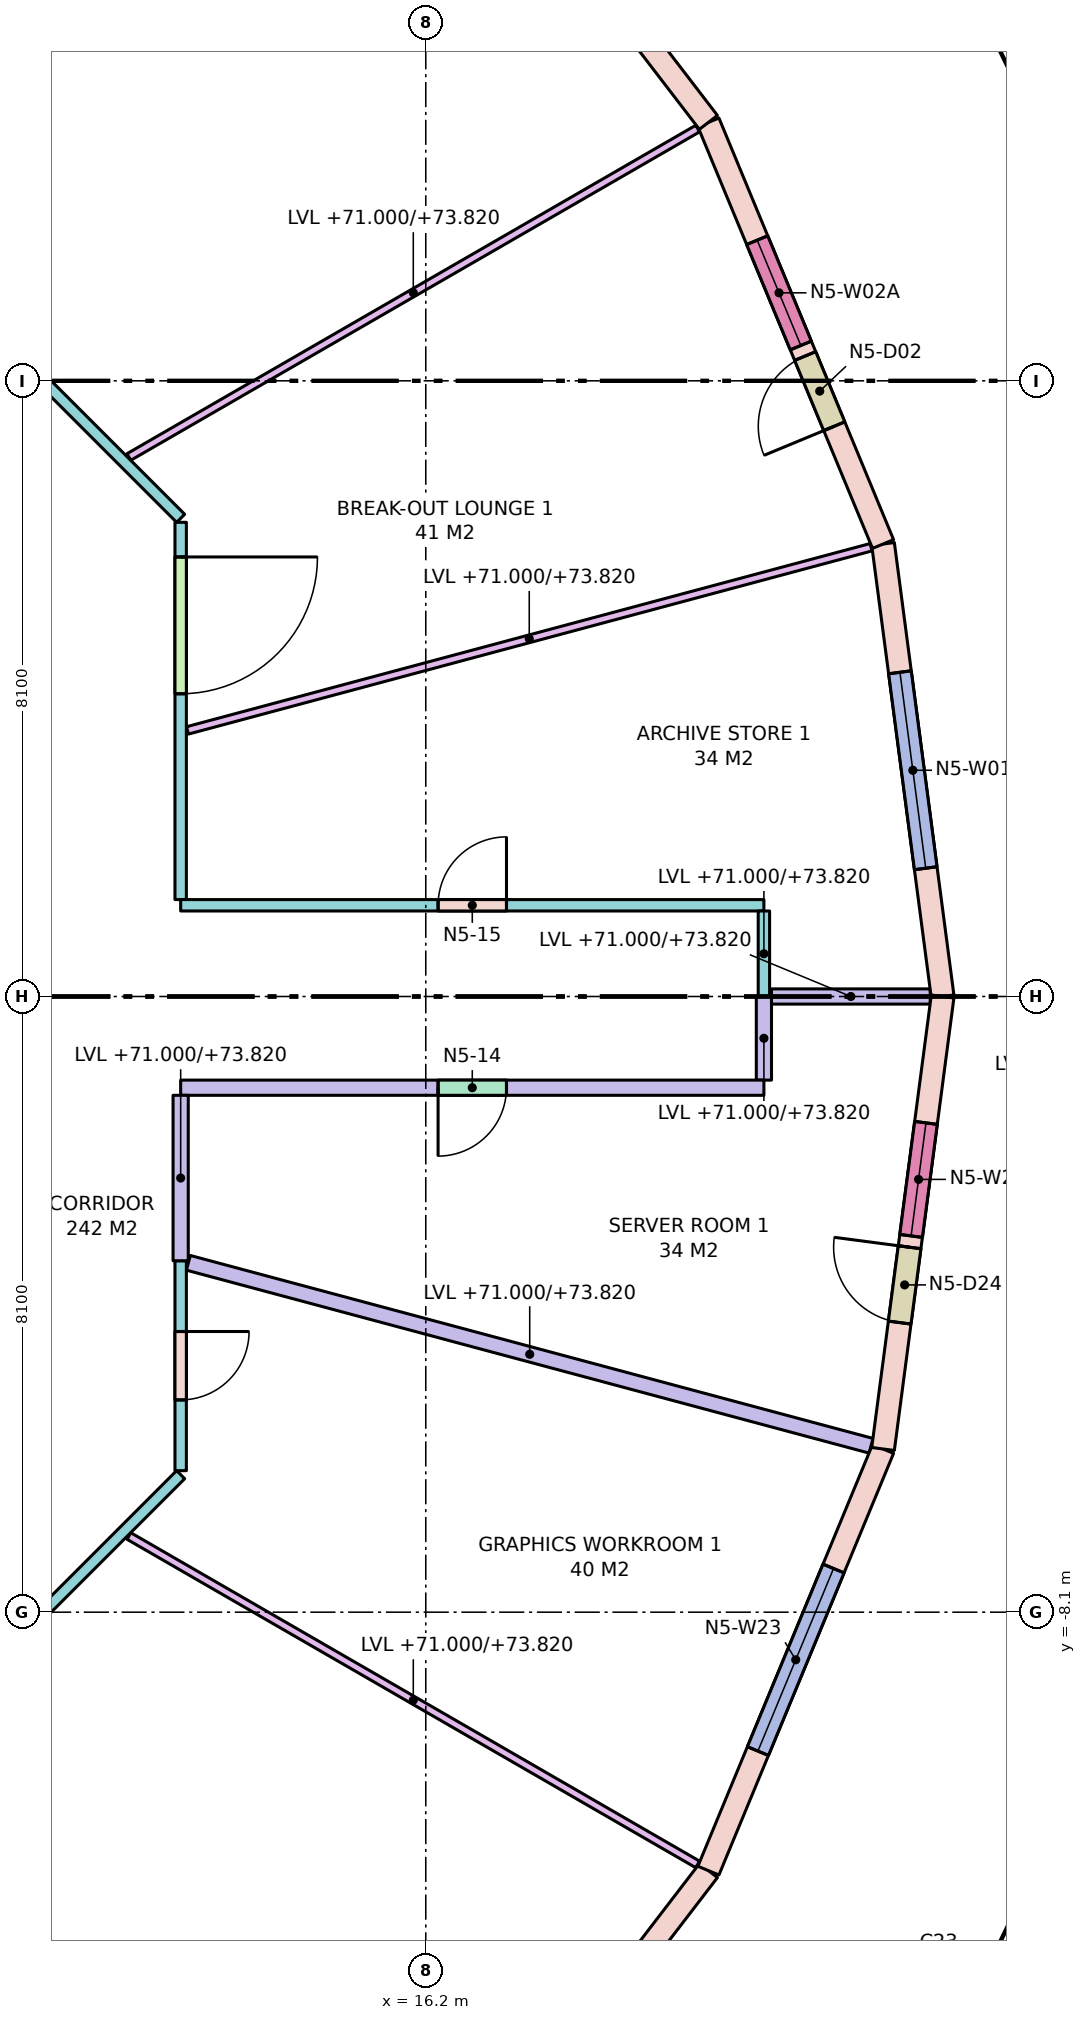
"""IFC4 building model, lengths in metres.
Left out: names, types, materials, properties, quantities, classifications, styles, units other than length and angle.
Written with IfcOpenShell. Run it as: python <this file> out.ifc"""

import sys

from ifc_helpers import new_model, si_unit, direction, frame, frame_2d, origin, place, context, subcontext, project, spatial, rectangle, extrude, element, fill, save


model = new_model("IFC4")
c1 = context("Model", 3, precision=1e-05, world=origin(), true_north=direction((0.0, 1.0)))
c2 = subcontext(c1, "Body", "Model", "MODEL_VIEW")
j1 = project(units=[si_unit("LENGTHUNIT", "METRE"), si_unit("PLANEANGLEUNIT", "RADIAN")], contexts=[c1])
p1 = place(None, origin())
s1 = spatial("IfcSite", under=j1, at=p1, CompositionType="ELEMENT")
p2 = place(p1, origin())
s2 = spatial("IfcBuilding", under=s1, at=p2, CompositionType="ELEMENT")
p3 = place(p2, frame((0.0, 0.0, 71.0)))
s3 = spatial("IfcBuildingStorey", under=s2, at=p3, CompositionType="ELEMENT", Elevation=71.0)
p4 = place(p3, frame((23.0, 0.0, 0.0), z_axis=(0.0, 0.0, 1.0), x_axis=(-0.130522880875, 0.991445297315, 0.0)))
e1 = element("IfcWall", 1, at=p4, inside=s3, PredefinedType="STANDARD", context=c2, shape_type="SweptSolid", body=[
    extrude(rectangle(XDim=6.004, YDim=0.3, at=frame_2d((3.002, 0.0))), origin(), (0.0, 0.0, 1.0), 3.72),
])
p5 = place(p4, frame((1.702, 0.0, 0.8)))
e2 = element("IfcOpeningElement", 2, at=p5, cuts=e1, PredefinedType="OPENING", context=c2, shape_type="SweptSolid", body=[
    extrude(rectangle(XDim=2.6, YDim=2.7, at=frame_2d((1.3, 1.35))), frame((0.0, 0.16, 0.0), z_axis=(0.0, -1.0, 0.0), x_axis=(1.0, 0.0, 0.0)), (0.0, 0.0, 1.0), 0.32),
])
p6 = place(p3, frame((22.216, 5.953, 0.0), z_axis=(0.0, 0.0, 1.0), x_axis=(-0.382671411433, 0.923884511653, 0.0)))
e3 = element("IfcWall", 3, at=p6, inside=s3, PredefinedType="STANDARD", context=c2, shape_type="SweptSolid", body=[
    extrude(rectangle(XDim=6.004, YDim=0.3, at=frame_2d((3.002, 0.0))), origin(), (0.0, 0.0, 1.0), 3.72),
])
p7 = place(p6, frame((1.677, 0.0, 0.0)))
e4 = element("IfcOpeningElement", 4, at=p7, cuts=e3, PredefinedType="OPENING", context=c2, shape_type="SweptSolid", body=[
    extrude(rectangle(XDim=1.0, YDim=2.4, at=frame_2d((0.5, 1.2))), frame((0.0, 0.16, 0.0), z_axis=(0.0, -1.0, 0.0), x_axis=(1.0, 0.0, 0.0)), (0.0, 0.0, 1.0), 0.32),
])
p8 = place(p6, frame((2.827, 0.0, 0.8)))
e5 = element("IfcOpeningElement", 5, at=p8, cuts=e3, PredefinedType="OPENING", context=c2, shape_type="SweptSolid", body=[
    extrude(rectangle(XDim=1.5, YDim=2.7, at=frame_2d((0.75, 1.35))), frame((0.0, 0.16, 0.0), z_axis=(0.0, -1.0, 0.0), x_axis=(1.0, 0.0, 0.0)), (0.0, 0.0, 1.0), 0.32),
])
p9 = place(p3, frame((19.919, 11.5, 0.0), z_axis=(0.0, 0.0, 1.0), x_axis=(-0.608778912074, 0.793339924758, 0.0)))
e6 = element("IfcWall", 6, at=p9, inside=s3, PredefinedType="STANDARD", context=c2, shape_type="SweptSolid", body=[
    extrude(rectangle(XDim=6.004, YDim=0.3, at=frame_2d((3.002, 0.0))), origin(), (0.0, 0.0, 1.0), 3.72),
])
p10 = place(p9, frame((1.702, 0.0, 0.8)))
e7 = element("IfcOpeningElement", 7, at=p10, cuts=e6, PredefinedType="OPENING", context=c2, shape_type="SweptSolid", body=[
    extrude(rectangle(XDim=2.6, YDim=2.7, at=frame_2d((1.3, 1.35))), frame((0.0, 0.16, 0.0), z_axis=(0.0, -1.0, 0.0), x_axis=(1.0, 0.0, 0.0)), (0.0, 0.0, 1.0), 0.32),
])
p11 = place(p3, frame((16.263, -16.263, 0.0), z_axis=(0.0, 0.0, 1.0), x_axis=(0.608778912074, 0.793339924758, 0.0)))
e8 = element("IfcWall", 8, at=p11, inside=s3, PredefinedType="STANDARD", context=c2, shape_type="SweptSolid", body=[
    extrude(rectangle(XDim=6.004, YDim=0.3, at=frame_2d((3.002, 0.0))), origin(), (0.0, 0.0, 1.0), 3.72),
])
p12 = place(p11, frame((1.677, 0.0, 0.0)))
e9 = element("IfcOpeningElement", 9, at=p12, cuts=e8, PredefinedType="OPENING", context=c2, shape_type="SweptSolid", body=[
    extrude(rectangle(XDim=1.0, YDim=2.4, at=frame_2d((0.5, 1.2))), frame((0.0, 0.16, 0.0), z_axis=(0.0, -1.0, 0.0), x_axis=(1.0, 0.0, 0.0)), (0.0, 0.0, 1.0), 0.32),
])
p13 = place(p11, frame((2.827, 0.0, 0.8)))
e10 = element("IfcOpeningElement", 10, at=p13, cuts=e8, PredefinedType="OPENING", context=c2, shape_type="SweptSolid", body=[
    extrude(rectangle(XDim=1.5, YDim=2.7, at=frame_2d((0.75, 1.35))), frame((0.0, 0.16, 0.0), z_axis=(0.0, -1.0, 0.0), x_axis=(1.0, 0.0, 0.0)), (0.0, 0.0, 1.0), 0.32),
])
p14 = place(p3, frame((19.919, -11.5, 0.0), z_axis=(0.0, 0.0, 1.0), x_axis=(0.382671411433, 0.923884511653, 0.0)))
e11 = element("IfcWall", 11, at=p14, inside=s3, PredefinedType="STANDARD", context=c2, shape_type="SweptSolid", body=[
    extrude(rectangle(XDim=6.004, YDim=0.3, at=frame_2d((3.002, 0.0))), origin(), (0.0, 0.0, 1.0), 3.72),
])
p15 = place(p14, frame((1.702, 0.0, 0.8)))
e12 = element("IfcOpeningElement", 12, at=p15, cuts=e11, PredefinedType="OPENING", context=c2, shape_type="SweptSolid", body=[
    extrude(rectangle(XDim=2.6, YDim=2.7, at=frame_2d((1.3, 1.35))), frame((0.0, 0.16, 0.0), z_axis=(0.0, -1.0, 0.0), x_axis=(1.0, 0.0, 0.0)), (0.0, 0.0, 1.0), 0.32),
])
p16 = place(p3, frame((22.216, -5.953, 0.0), z_axis=(0.0, 0.0, 1.0), x_axis=(0.130522880875, 0.991445297315, 0.0)))
e13 = element("IfcWall", 13, at=p16, inside=s3, PredefinedType="STANDARD", context=c2, shape_type="SweptSolid", body=[
    extrude(rectangle(XDim=6.004, YDim=0.3, at=frame_2d((3.002, 0.0))), origin(), (0.0, 0.0, 1.0), 3.72),
])
p17 = place(p16, frame((1.677, 0.0, 0.0)))
e14 = element("IfcOpeningElement", 14, at=p17, cuts=e13, PredefinedType="OPENING", context=c2, shape_type="SweptSolid", body=[
    extrude(rectangle(XDim=1.0, YDim=2.4, at=frame_2d((0.5, 1.2))), frame((0.0, 0.16, 0.0), z_axis=(0.0, -1.0, 0.0), x_axis=(1.0, 0.0, 0.0)), (0.0, 0.0, 1.0), 0.32),
])
p18 = place(p16, frame((2.827, 0.0, 0.8)))
e15 = element("IfcOpeningElement", 15, at=p18, cuts=e13, PredefinedType="OPENING", context=c2, shape_type="SweptSolid", body=[
    extrude(rectangle(XDim=1.5, YDim=2.7, at=frame_2d((0.75, 1.35))), frame((0.0, 0.16, 0.0), z_axis=(0.0, -1.0, 0.0), x_axis=(1.0, 0.0, 0.0)), (0.0, 0.0, 1.0), 0.32),
])
p19 = place(p3, frame((8.328, 10.938, 0.0), z_axis=(0.0, 0.0, 1.0), x_axis=(0.707125355289, -0.707088206597, 0.0)))
e16 = element("IfcWall", 16, at=p19, inside=s3, PredefinedType="PARTITIONING", context=c2, shape_type="SweptSolid", body=[
    extrude(rectangle(XDim=6.572, YDim=0.15, at=frame_2d((3.286, 0.0))), origin(), (0.0, 0.0, 1.0), 2.82),
])
p20 = place(p3, frame((12.975, 6.238, 0.0), z_axis=(0.0, 0.0, 1.0), x_axis=(0.0, -1.0, 0.0)))
e17 = element("IfcWall", 17, at=p20, inside=s3, PredefinedType="PARTITIONING", context=c2, shape_type="SweptSolid", body=[
    extrude(rectangle(XDim=4.963, YDim=0.15, at=frame_2d((2.482, 0.0))), origin(), (0.0, 0.0, 1.0), 2.82),
])
p21 = place(p20, frame((0.456, 0.0, 0.0)))
e18 = element("IfcOpeningElement", 18, at=p21, cuts=e17, PredefinedType="OPENING", context=c2, shape_type="SweptSolid", body=[
    extrude(rectangle(XDim=1.8, YDim=2.1, at=frame_2d((0.9, 1.05))), frame((0.0, 0.085, 0.0), z_axis=(0.0, -1.0, 0.0), x_axis=(1.0, 0.0, 0.0)), (0.0, 0.0, 1.0), 0.17),
])
p22 = place(p3, frame((12.975, 1.2, 0.0), z_axis=(0.0, 0.0, 1.0), x_axis=(1.0, 0.0, 0.0)))
e19 = element("IfcWall", 19, at=p22, inside=s3, PredefinedType="PARTITIONING", context=c2, shape_type="SweptSolid", body=[
    extrude(rectangle(XDim=7.674, YDim=0.15, at=frame_2d((3.837, 0.0))), origin(), (0.0, 0.0, 1.0), 3.72),
])
p23 = place(p22, frame((3.387, 0.0, 0.0)))
e20 = element("IfcOpeningElement", 20, at=p23, cuts=e19, PredefinedType="OPENING", context=c2, shape_type="SweptSolid", body=[
    extrude(rectangle(XDim=0.9, YDim=2.1, at=frame_2d((0.45, 1.05))), frame((0.0, 0.085, 0.0), z_axis=(0.0, -1.0, 0.0), x_axis=(1.0, 0.0, 0.0)), (0.0, 0.0, 1.0), 0.17),
])
p24 = place(p3, frame((20.649, 1.125, 0.0), z_axis=(0.0, 0.0, 1.0), x_axis=(0.0, -1.0, 0.0)))
e21 = element("IfcWall", 21, at=p24, inside=s3, PredefinedType="PARTITIONING", context=c2, shape_type="SweptSolid", body=[
    extrude(rectangle(XDim=1.125, YDim=0.15, at=frame_2d((0.562, 0.0))), origin(), (0.0, 0.0, 1.0), 2.82),
])
p25 = place(p3, frame((20.649, 0.0, 0.0), z_axis=(0.0, 0.0, 1.0), x_axis=(0.0, -1.0, 0.0)))
e22 = element("IfcWall", 22, at=p25, inside=s3, PredefinedType="PARTITIONING", context=c2, shape_type="SweptSolid", body=[
    extrude(rectangle(XDim=1.1, YDim=0.2, at=frame_2d((0.55, 0.0))), origin(), (0.0, 0.0, 1.0), 2.82),
])
p26 = place(p3, frame((20.649, -1.2, 0.0), z_axis=(0.0, 0.0, 1.0), x_axis=(-1.0, 0.0, 0.0)))
e23 = element("IfcWall", 23, at=p26, inside=s3, PredefinedType="PARTITIONING", context=c2, shape_type="SweptSolid", body=[
    extrude(rectangle(XDim=7.674, YDim=0.2, at=frame_2d((3.837, 0.0))), origin(), (0.0, 0.0, 1.0), 3.72),
])
p27 = place(p26, frame((3.387, 0.0, 0.0)))
e24 = element("IfcOpeningElement", 24, at=p27, cuts=e23, PredefinedType="OPENING", context=c2, shape_type="SweptSolid", body=[
    extrude(rectangle(XDim=0.9, YDim=2.1, at=frame_2d((0.45, 1.05))), frame((0.0, 0.11, 0.0), z_axis=(0.0, -1.0, 0.0), x_axis=(1.0, 0.0, 0.0)), (0.0, 0.0, 1.0), 0.22),
])
p28 = place(p3, frame((12.975, -1.3, 0.0), z_axis=(0.0, 0.0, 1.0), x_axis=(0.0, -1.0, 0.0)))
e25 = element("IfcWall", 25, at=p28, inside=s3, PredefinedType="PARTITIONING", context=c2, shape_type="SweptSolid", body=[
    extrude(rectangle(XDim=2.177, YDim=0.2, at=frame_2d((1.088, 0.0))), origin(), (0.0, 0.0, 1.0), 2.82),
])
p29 = place(p3, frame((12.975, -3.477, 0.0), z_axis=(0.0, 0.0, 1.0), x_axis=(0.0, -1.0, 0.0)))
e26 = element("IfcWall", 26, at=p29, inside=s3, PredefinedType="PARTITIONING", context=c2, shape_type="SweptSolid", body=[
    extrude(rectangle(XDim=2.762, YDim=0.15, at=frame_2d((1.381, 0.0))), origin(), (0.0, 0.0, 1.0), 2.82),
])
p30 = place(p29, frame((0.931, 0.0, 0.0)))
e27 = element("IfcOpeningElement", 27, at=p30, cuts=e26, PredefinedType="OPENING", context=c2, shape_type="SweptSolid", body=[
    extrude(rectangle(XDim=0.9, YDim=2.1, at=frame_2d((0.45, 1.05))), frame((0.0, 0.085, 0.0), z_axis=(0.0, -1.0, 0.0), x_axis=(1.0, 0.0, 0.0)), (0.0, 0.0, 1.0), 0.17),
])
p31 = place(p3, frame((12.975, -6.291, 0.0), z_axis=(0.0, 0.0, 1.0), x_axis=(-0.707125355289, -0.707088206597, 0.0)))
e28 = element("IfcWall", 28, at=p31, inside=s3, PredefinedType="PARTITIONING", context=c2, shape_type="SweptSolid", body=[
    extrude(rectangle(XDim=6.572, YDim=0.15, at=frame_2d((3.286, 0.0))), origin(), (0.0, 0.0, 1.0), 2.82),
])
p32 = place(p31, frame((3.298, 0.0, 0.0)))
e29 = element("IfcOpeningElement", 29, at=p32, cuts=e28, PredefinedType="OPENING", context=c2, shape_type="SweptSolid", body=[
    extrude(rectangle(XDim=1.0, YDim=2.1, at=frame_2d((0.5, 1.05))), frame((0.0, 0.085, 0.0), z_axis=(0.0, -1.0, 0.0), x_axis=(1.0, 0.0, 0.0)), (0.0, 0.0, 1.0), 0.17),
])
p33 = place(p3, frame((20.749, 0.0, 0.0), z_axis=(0.0, 0.0, 1.0), x_axis=(1.0, 0.0, 0.0)))
e30 = element("IfcWall", 30, at=p33, inside=s3, PredefinedType="PARTITIONING", context=c2, shape_type="SweptSolid", body=[
    extrude(rectangle(XDim=2.088, YDim=0.2, at=frame_2d((1.044, 0.0))), origin(), (0.0, 0.0, 1.0), 2.82),
])
p34 = place(p3, frame((13.064, 3.5, 0.0), z_axis=(0.0, 0.0, 1.0), x_axis=(0.965922655056, 0.258830880017, 0.0)))
e31 = element("IfcWall", 31, at=p34, inside=s3, PredefinedType="PARTITIONING", context=c2, shape_type="SweptSolid", body=[
    extrude(rectangle(XDim=9.312, YDim=0.1, at=frame_2d((4.656, 0.0))), origin(), (0.0, 0.0, 1.0), 2.82),
])
p35 = place(p3, frame((12.294, 7.098, 0.0), z_axis=(0.0, 0.0, 1.0), x_axis=(0.866010547425, 0.500025731086, 0.0)))
e32 = element("IfcWall", 32, at=p35, inside=s3, PredefinedType="PARTITIONING", context=c2, shape_type="SweptSolid", body=[
    extrude(rectangle(XDim=8.641, YDim=0.1, at=frame_2d((4.32, 0.0))), origin(), (0.0, 0.0, 1.0), 2.82),
])
p36 = place(p3, frame((6.394, -11.075, 0.0), z_axis=(0.0, 0.0, 1.0), x_axis=(0.500024592647, -0.866011204747, 0.0)))
e33 = element("IfcWall", 33, at=p36, inside=s3, PredefinedType="PARTITIONING", context=c2, shape_type="SweptSolid", body=[
    extrude(rectangle(XDim=10.049, YDim=0.1, at=frame_2d((5.024, 0.0))), origin(), (0.0, 0.0, 1.0), 2.82),
])
p37 = place(p3, frame((12.294, -7.098, 0.0), z_axis=(0.0, 0.0, 1.0), x_axis=(0.866010547425, -0.500025731086, 0.0)))
e34 = element("IfcWall", 34, at=p37, inside=s3, PredefinedType="PARTITIONING", context=c2, shape_type="SweptSolid", body=[
    extrude(rectangle(XDim=8.641, YDim=0.1, at=frame_2d((4.32, 0.0))), origin(), (0.0, 0.0, 1.0), 2.82),
])
p38 = place(p3, frame((13.076, -3.504, 0.0), z_axis=(0.0, 0.0, 1.0), x_axis=(0.965926605639, -0.258816136511, 0.0)))
e35 = element("IfcWall", 35, at=p38, inside=s3, PredefinedType="PARTITIONING", context=c2, shape_type="SweptSolid", body=[
    extrude(rectangle(XDim=9.299, YDim=0.2, at=frame_2d((4.649, 0.0))), origin(), (0.0, 0.0, 1.0), 2.82),
])
p39 = place(p5, origin())
e36 = element("IfcWindow", 36, at=p39, inside=s3, PartitioningType="SINGLE_PANEL", PredefinedType="WINDOW", context=c2, shape_type="SweptSolid", body=[
    extrude(rectangle(XDim=2.6, YDim=2.7, at=frame_2d((1.3, 1.35))), frame((0.0, 0.03, 0.0), z_axis=(0.0, -1.0, 0.0), x_axis=(1.0, 0.0, 0.0)), (0.0, 0.0, 1.0), 0.06),
])
fill(e2, e36)
p40 = place(p7, origin())
e37 = element("IfcDoor", 37, at=p40, inside=s3, OperationType="SINGLE_SWING_LEFT", PredefinedType="DOOR", context=c2, shape_type="SweptSolid", body=[
    extrude(rectangle(XDim=1.0, YDim=2.4, at=frame_2d((0.5, 1.2))), frame((0.0, 0.025, 0.0), z_axis=(0.0, -1.0, 0.0), x_axis=(1.0, 0.0, 0.0)), (0.0, 0.0, 1.0), 0.05),
])
fill(e4, e37)
p41 = place(p8, origin())
e38 = element("IfcWindow", 38, at=p41, inside=s3, PartitioningType="SINGLE_PANEL", PredefinedType="WINDOW", context=c2, shape_type="SweptSolid", body=[
    extrude(rectangle(XDim=1.5, YDim=2.7, at=frame_2d((0.75, 1.35))), frame((0.0, 0.03, 0.0), z_axis=(0.0, -1.0, 0.0), x_axis=(1.0, 0.0, 0.0)), (0.0, 0.0, 1.0), 0.06),
])
fill(e5, e38)
p42 = place(p15, origin())
e39 = element("IfcWindow", 39, at=p42, inside=s3, PartitioningType="SINGLE_PANEL", PredefinedType="WINDOW", context=c2, shape_type="SweptSolid", body=[
    extrude(rectangle(XDim=2.6, YDim=2.7, at=frame_2d((1.3, 1.35))), frame((0.0, 0.03, 0.0), z_axis=(0.0, -1.0, 0.0), x_axis=(1.0, 0.0, 0.0)), (0.0, 0.0, 1.0), 0.06),
])
fill(e12, e39)
p43 = place(p17, origin())
e40 = element("IfcDoor", 40, at=p43, inside=s3, OperationType="SINGLE_SWING_RIGHT", PredefinedType="DOOR", context=c2, shape_type="SweptSolid", body=[
    extrude(rectangle(XDim=1.0, YDim=2.4, at=frame_2d((0.5, 1.2))), frame((0.0, 0.025, 0.0), z_axis=(0.0, -1.0, 0.0), x_axis=(1.0, 0.0, 0.0)), (0.0, 0.0, 1.0), 0.05),
])
fill(e14, e40)
p44 = place(p18, origin())
e41 = element("IfcWindow", 41, at=p44, inside=s3, PartitioningType="SINGLE_PANEL", PredefinedType="WINDOW", context=c2, shape_type="SweptSolid", body=[
    extrude(rectangle(XDim=1.5, YDim=2.7, at=frame_2d((0.75, 1.35))), frame((0.0, 0.03, 0.0), z_axis=(0.0, -1.0, 0.0), x_axis=(1.0, 0.0, 0.0)), (0.0, 0.0, 1.0), 0.06),
])
fill(e15, e41)
p45 = place(p30, origin())
e42 = element("IfcDoor", 42, at=p45, inside=s3, OperationType="SINGLE_SWING_LEFT", PredefinedType="DOOR", context=c2, shape_type="SweptSolid", body=[
    extrude(rectangle(XDim=0.9, YDim=2.1, at=frame_2d((0.45, 1.05))), frame((0.0, 0.025, 0.0), z_axis=(0.0, -1.0, 0.0), x_axis=(1.0, 0.0, 0.0)), (0.0, 0.0, 1.0), 0.05),
])
fill(e27, e42)
p46 = place(p27, origin())
e43 = element("IfcDoor", 43, at=p46, inside=s3, OperationType="SINGLE_SWING_RIGHT", PredefinedType="DOOR", context=c2, shape_type="SweptSolid", body=[
    extrude(rectangle(XDim=0.9, YDim=2.1, at=frame_2d((0.45, 1.05))), frame((0.0, 0.025, 0.0), z_axis=(0.0, -1.0, 0.0), x_axis=(1.0, 0.0, 0.0)), (0.0, 0.0, 1.0), 0.05),
])
fill(e24, e43)
p47 = place(p23, origin())
e44 = element("IfcDoor", 44, at=p47, inside=s3, OperationType="SINGLE_SWING_RIGHT", PredefinedType="DOOR", context=c2, shape_type="SweptSolid", body=[
    extrude(rectangle(XDim=0.9, YDim=2.1, at=frame_2d((0.45, 1.05))), frame((0.0, 0.025, 0.0), z_axis=(0.0, -1.0, 0.0), x_axis=(1.0, 0.0, 0.0)), (0.0, 0.0, 1.0), 0.05),
])
fill(e20, e44)
p48 = place(p21, origin())
e45 = element("IfcDoor", 45, at=p48, inside=s3, OperationType="DOUBLE_DOOR_SINGLE_SWING", PredefinedType="DOOR", context=c2, shape_type="SweptSolid", body=[
    extrude(rectangle(XDim=1.8, YDim=2.1, at=frame_2d((0.9, 1.05))), frame((0.0, 0.025, 0.0), z_axis=(0.0, -1.0, 0.0), x_axis=(1.0, 0.0, 0.0)), (0.0, 0.0, 1.0), 0.05),
])
fill(e18, e45)
save(model, sys.argv[1])
